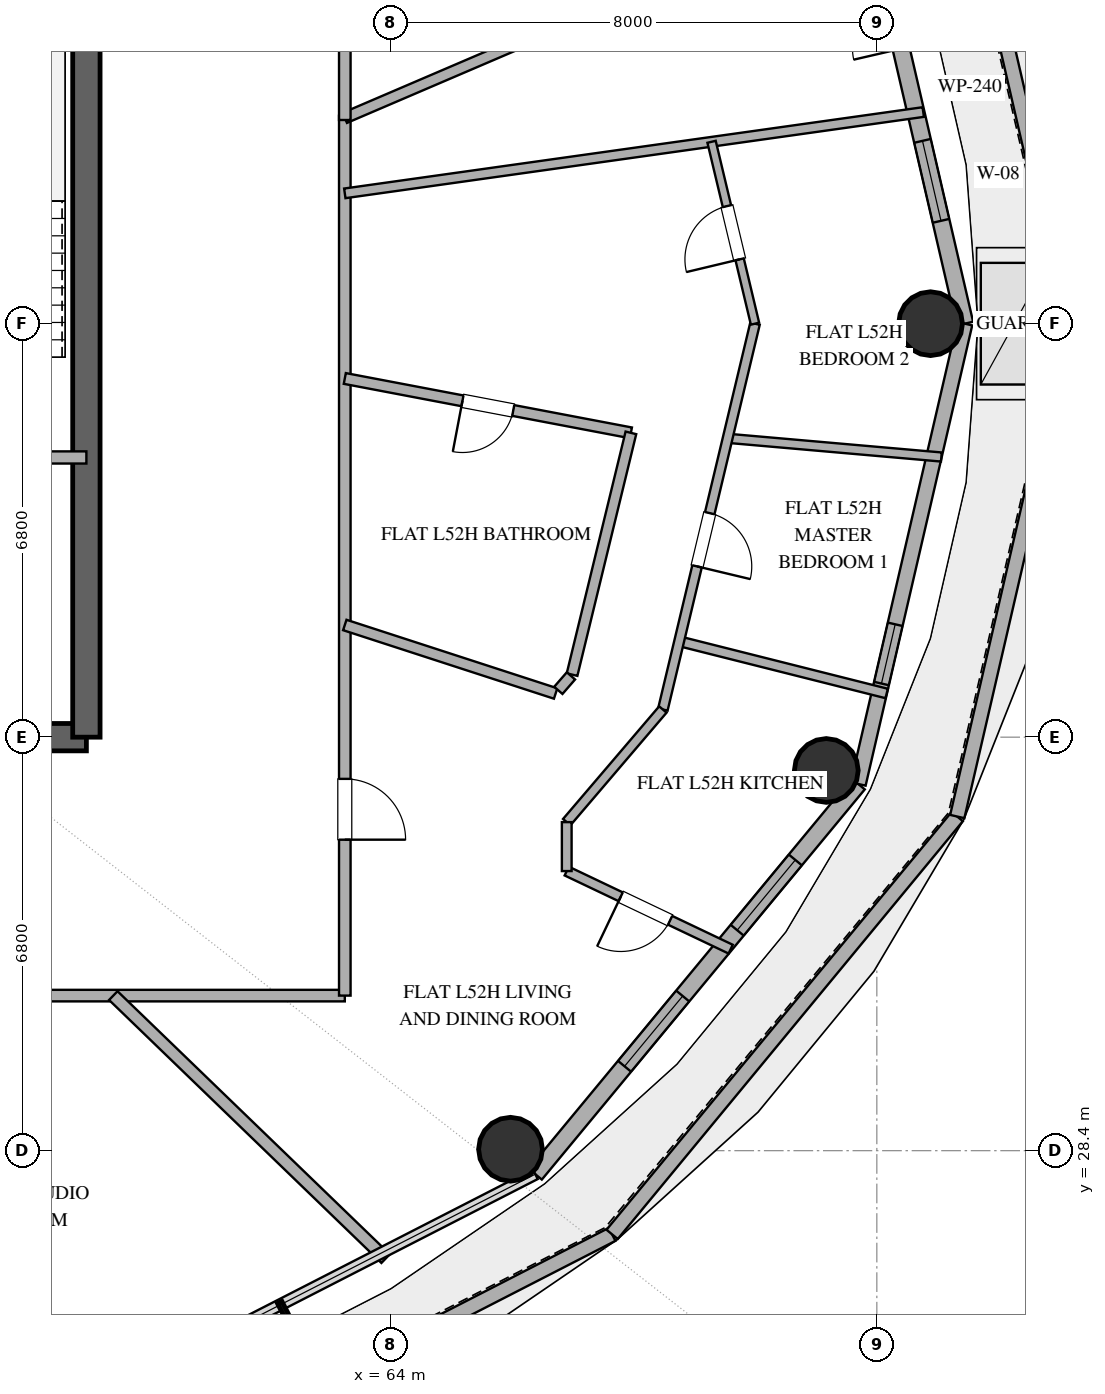
"""IFC4 building model, lengths in metres.
Left out: names, types, materials, properties, quantities, classifications, styles, units other than length and angle.
Written with IfcOpenShell. Run it as: python <this file> out.ifc"""

import sys

from ifc_helpers import new_model, si_unit, direction, frame, frame_2d, origin, origin_2d, place, context, subcontext, project, spatial, rectangle, hollow_circle, extrude, element, fill, save


model = new_model("IFC4")
c1 = context("Model", 3, precision=1e-05, world=origin(), true_north=direction((0.0, 1.0)))
c2 = subcontext(c1, "Body", "Model", "MODEL_VIEW")
j1 = project(units=[si_unit("LENGTHUNIT", "METRE"), si_unit("PLANEANGLEUNIT", "RADIAN")], contexts=[c1])
p1 = place(None, origin())
s1 = spatial("IfcSite", under=j1, at=p1, CompositionType="ELEMENT")
p2 = place(p1, origin())
s2 = spatial("IfcBuilding", under=s1, at=p2, CompositionType="ELEMENT")
p3 = place(p2, frame((0.0, 0.0, 206.4)))
s3 = spatial("IfcBuildingStorey", under=s2, at=p3, CompositionType="ELEMENT", Elevation=206.4)
p4 = place(p3, frame((55.0, 35.2, 0.0), z_axis=(0.0, 0.0, 1.0), x_axis=(1.0, 0.0, 0.0)))
e1 = element("IfcWall", 1, at=p4, inside=s3, PredefinedType="SHEAR", context=c2, shape_type="SweptSolid", body=[
    extrude(rectangle(XDim=4.0, YDim=0.45, at=frame_2d((2.0, 0.0))), origin(), (0.0, 0.0, 1.0), 3.36),
])
p5 = place(p4, frame((1.4, 0.0, 0.0)))
e2 = element("IfcOpeningElement", 2, at=p5, cuts=e1, PredefinedType="OPENING", context=c2, shape_type="SweptSolid", body=[
    extrude(rectangle(XDim=1.2, YDim=2.15, at=frame_2d((0.6, 1.075))), frame((0.0, 0.235, 0.0), z_axis=(0.0, -1.0, 0.0), x_axis=(1.0, 0.0, 0.0)), (0.0, 0.0, 1.0), 0.47),
])
p6 = place(p3, frame((59.0, 35.2, 0.0), z_axis=(0.0, 0.0, 1.0), x_axis=(0.0, 1.0, 0.0)))
e3 = element("IfcWall", 3, at=p6, inside=s3, PredefinedType="SHEAR", context=c2, shape_type="SweptSolid", body=[
    extrude(rectangle(XDim=13.6, YDim=0.45, at=frame_2d((6.8, 0.0))), origin(), (0.0, 0.0, 1.0), 3.36),
])
for number, where, z_axis, x_axis in (
    (4, (72.883, 42.0, 0.0), (0.0, 0.0, 1.0), (1.0, 0.0, 0.0)),
    (5, (65.975, 28.424, 0.0), (0.0, 0.0, 1.0), (1.0, 0.0, 0.0)),
    (6, (71.169, 34.653, 0.0), (0.0, 0.0, 1.0), (1.0, 0.0, 0.0)),
):
    element("IfcColumn", number, at=place(p3, frame(where, z_axis=z_axis, x_axis=x_axis)), inside=s3, PredefinedType="COLUMN", context=c2, shape_type="SweptSolid", body=[
        extrude(hollow_circle(Radius=0.525, WallThickness=0.028, at=origin_2d()), origin(), (0.0, 0.0, 1.0), 3.36),
    ])
p7 = place(p3, frame((75.197, 42.0, 0.0), z_axis=(0.0, 0.0, 1.0), x_axis=(-0.225241005172, 0.974303078918, 0.0)))
e7 = element("IfcWall", 7, at=p7, inside=s3, PredefinedType="PARAPET", context=c2, shape_type="SweptSolid", body=[
    extrude(rectangle(XDim=8.319, YDim=0.24, at=frame_2d((4.16, 0.0))), origin(), (0.0, 0.0, 1.0), 1.25),
])
p8 = place(p3, frame((58.701, 22.432, 0.0), z_axis=(0.0, 0.0, 1.0), x_axis=(0.889652072391, 0.456639015077, 0.0)))
e8 = element("IfcWall", 8, at=p8, inside=s3, PredefinedType="PARAPET", context=c2, shape_type="SweptSolid", body=[
    extrude(rectangle(XDim=10.055, YDim=0.24, at=frame_2d((5.027, 0.0))), origin(), (0.0, 0.0, 1.0), 1.25),
])
p9 = place(p3, frame((67.646, 27.023, 0.0), z_axis=(0.0, 0.0, 1.0), x_axis=(0.636894188862, 0.770951225561, 0.0)))
e9 = element("IfcWall", 9, at=p9, inside=s3, PredefinedType="PARAPET", context=c2, shape_type="SweptSolid", body=[
    extrude(rectangle(XDim=8.913, YDim=0.24, at=frame_2d((4.457, 0.0))), origin(), (0.0, 0.0, 1.0), 1.25),
])
p10 = place(p3, frame((73.323, 33.895, 0.0), z_axis=(0.0, 0.0, 1.0), x_axis=(0.225241005172, 0.974303078918, 0.0)))
e10 = element("IfcWall", 10, at=p10, inside=s3, PredefinedType="PARAPET", context=c2, shape_type="SweptSolid", body=[
    extrude(rectangle(XDim=8.319, YDim=0.24, at=frame_2d((4.16, 0.0))), origin(), (0.0, 0.0, 1.0), 1.25),
])
p11 = place(p3, frame((73.447, 42.0, 0.0), z_axis=(0.0, 0.0, 1.0), x_axis=(-0.225635078214, 0.974211892495, 0.0)))
e11 = element("IfcWall", 11, at=p11, inside=s3, PredefinedType="SOLIDWALL", context=c2, shape_type="SweptSolid", body=[
    extrude(rectangle(XDim=7.77, YDim=0.28, at=frame_2d((3.885, 0.0))), origin(), (0.0, 0.0, 1.0), 3.36),
])
p12 = place(p11, frame((1.736, 0.0, 0.85)))
e12 = element("IfcOpeningElement", 12, at=p12, cuts=e11, PredefinedType="OPENING", context=c2, shape_type="SweptSolid", body=[
    extrude(rectangle(XDim=1.35, YDim=1.8, at=frame_2d((0.675, 0.9))), frame((0.0, 0.15, 0.0), z_axis=(0.0, -1.0, 0.0), x_axis=(1.0, 0.0, 0.0)), (0.0, 0.0, 1.0), 0.3),
])
p13 = place(p11, frame((4.642, 0.0, 0.0)))
e13 = element("IfcOpeningElement", 13, at=p13, cuts=e11, PredefinedType="OPENING", context=c2, shape_type="SweptSolid", body=[
    extrude(rectangle(XDim=1.6, YDim=2.25, at=frame_2d((0.8, 1.125))), frame((0.0, 0.15, 0.0), z_axis=(0.0, -1.0, 0.0), x_axis=(1.0, 0.0, 0.0)), (0.0, 0.0, 1.0), 0.3),
])
p14 = place(p3, frame((66.383, 28.013, 0.0), z_axis=(0.0, 0.0, 1.0), x_axis=(0.63761509934, 0.770355103243, 0.0)))
e14 = element("IfcWall", 14, at=p14, inside=s3, PredefinedType="SOLIDWALL", context=c2, shape_type="SweptSolid", body=[
    extrude(rectangle(XDim=8.33, YDim=0.28, at=frame_2d((4.165, 0.0))), origin(), (0.0, 0.0, 1.0), 3.36),
])
p15 = place(p14, frame((2.303, 0.0, 0.85)))
e15 = element("IfcOpeningElement", 15, at=p15, cuts=e14, PredefinedType="OPENING", context=c2, shape_type="SweptSolid", body=[
    extrude(rectangle(XDim=1.5, YDim=2.0, at=frame_2d((0.75, 1.0))), frame((0.0, 0.15, 0.0), z_axis=(0.0, -1.0, 0.0), x_axis=(1.0, 0.0, 0.0)), (0.0, 0.0, 1.0), 0.3),
])
p16 = place(p14, frame((5.208, 0.0, 0.85)))
e16 = element("IfcOpeningElement", 16, at=p16, cuts=e14, PredefinedType="OPENING", context=c2, shape_type="SweptSolid", body=[
    extrude(rectangle(XDim=1.5, YDim=1.8, at=frame_2d((0.75, 0.9))), frame((0.0, 0.15, 0.0), z_axis=(0.0, -1.0, 0.0), x_axis=(1.0, 0.0, 0.0)), (0.0, 0.0, 1.0), 0.3),
])
p17 = place(p3, frame((71.694, 34.43, 0.0), z_axis=(0.0, 0.0, 1.0), x_axis=(0.225635078214, 0.974211892495, 0.0)))
e17 = element("IfcWall", 17, at=p17, inside=s3, PredefinedType="SOLIDWALL", context=c2, shape_type="SweptSolid", body=[
    extrude(rectangle(XDim=7.77, YDim=0.25, at=frame_2d((3.885, 0.0))), origin(), (0.0, 0.0, 1.0), 3.36),
])
p18 = place(p17, frame((1.695, 0.0, 1.42)))
e18 = element("IfcOpeningElement", 18, at=p18, cuts=e17, PredefinedType="OPENING", context=c2, shape_type="SweptSolid", body=[
    extrude(rectangle(XDim=1.0, YDim=1.05, at=frame_2d((0.5, 0.525))), frame((0.0, 0.135, 0.0), z_axis=(0.0, -1.0, 0.0), x_axis=(1.0, 0.0, 0.0)), (0.0, 0.0, 1.0), 0.27),
])
p19 = place(p3, frame((55.0, 39.8, 0.0), z_axis=(0.0, 0.0, 1.0), x_axis=(1.0, 0.0, 0.0)))
e19 = element("IfcWall", 19, at=p19, inside=s3, PredefinedType="SOLIDWALL", context=c2, shape_type="SweptSolid", body=[
    extrude(rectangle(XDim=4.0, YDim=0.2, at=frame_2d((2.0, 0.0))), origin(), (0.0, 0.0, 1.0), 2.72),
])
p20 = place(p19, frame((1.45, 0.0, 0.0)))
e20 = element("IfcOpeningElement", 20, at=p20, cuts=e19, PredefinedType="OPENING", context=c2, shape_type="SweptSolid", body=[
    extrude(rectangle(XDim=1.1, YDim=2.15, at=frame_2d((0.55, 1.075))), frame((0.0, 0.11, 0.0), z_axis=(0.0, -1.0, 0.0), x_axis=(1.0, 0.0, 0.0)), (0.0, 0.0, 1.0), 0.22),
])
p21 = place(p3, frame((50.961, 30.95, 0.0), z_axis=(0.0, 0.0, 1.0), x_axis=(1.0, 0.0, 0.0)))
e21 = element("IfcWall", 21, at=p21, inside=s3, PredefinedType="PARTITIONING", context=c2, shape_type="SweptSolid", body=[
    extrude(rectangle(XDim=12.289, YDim=0.19, at=frame_2d((6.145, 0.0))), origin(), (0.0, 0.0, 1.0), 2.72),
])
p22 = place(p21, frame((3.741, 0.0, 0.0)))
e22 = element("IfcOpeningElement", 22, at=p22, cuts=e21, PredefinedType="OPENING", context=c2, shape_type="SweptSolid", body=[
    extrude(rectangle(XDim=1.0, YDim=2.2, at=frame_2d((0.5, 1.1))), frame((0.0, 0.105, 0.0), z_axis=(0.0, -1.0, 0.0), x_axis=(1.0, 0.0, 0.0)), (0.0, 0.0, 1.0), 0.21),
])
p23 = place(p3, frame((63.921, 26.625, 0.0), z_axis=(0.0, 0.0, 1.0), x_axis=(-0.719350784266, 0.69464699609, 0.0)))
e23 = element("IfcWall", 23, at=p23, inside=s3, PredefinedType="PARTITIONING", context=c2, shape_type="SweptSolid", body=[
    extrude(rectangle(XDim=6.226, YDim=0.2, at=frame_2d((3.113, 0.0))), origin(), (0.0, 0.0, 1.0), 2.72),
])
p24 = place(p3, frame((63.25, 45.419, 0.0), z_axis=(0.0, 0.0, 1.0), x_axis=(0.0, -1.0, 0.0)))
e24 = element("IfcWall", 24, at=p24, inside=s3, PredefinedType="PARTITIONING", context=c2, shape_type="SweptSolid", body=[
    extrude(rectangle(XDim=14.469, YDim=0.19, at=frame_2d((7.235, 0.0))), origin(), (0.0, 0.0, 1.0), 2.72),
])
p25 = place(p24, frame((10.905, 0.0, 0.0)))
e25 = element("IfcOpeningElement", 25, at=p25, cuts=e24, PredefinedType="OPENING", context=c2, shape_type="SweptSolid", body=[
    extrude(rectangle(XDim=1.0, YDim=2.2, at=frame_2d((0.5, 1.1))), frame((0.0, 0.105, 0.0), z_axis=(0.0, -1.0, 0.0), x_axis=(1.0, 0.0, 0.0)), (0.0, 0.0, 1.0), 0.21),
])
p26 = place(p3, frame((63.25, 44.143, 0.0), z_axis=(0.0, 0.0, 1.0), x_axis=(0.990269661234, 0.139161769316, 0.0)))
e26 = element("IfcWall", 26, at=p26, inside=s3, PredefinedType="PLUMBINGWALL", context=c2, shape_type="SweptSolid", body=[
    extrude(rectangle(XDim=9.607, YDim=0.16, at=frame_2d((4.803, 0.0))), origin(), (0.0, 0.0, 1.0), 2.72),
])
p27 = place(p3, frame((68.407, 47.595, 0.0), z_axis=(0.0, 0.0, 1.0), x_axis=(-0.919138278408, -0.393935051963, 0.0)))
e27 = element("IfcWall", 27, at=p27, inside=s3, PredefinedType="PLUMBINGWALL", context=c2, shape_type="SweptSolid", body=[
    extrude(rectangle(XDim=5.611, YDim=0.18, at=frame_2d((2.806, 0.0))), origin(), (0.0, 0.0, 1.0), 2.72),
])
p28 = place(p3, frame((67.955, 40.205, 0.0), z_axis=(0.0, 0.0, 1.0), x_axis=(-0.982404536053, 0.186765434551, 0.0)))
e28 = element("IfcWall", 28, at=p28, inside=s3, PredefinedType="PLUMBINGWALL", context=c2, shape_type="SweptSolid", body=[
    extrude(rectangle(XDim=4.79, YDim=0.18, at=frame_2d((2.395, 0.0))), origin(), (0.0, 0.0, 1.0), 2.72),
])
p29 = place(p28, frame((1.97, 0.0, 0.0)))
e29 = element("IfcOpeningElement", 29, at=p29, cuts=e28, PredefinedType="OPENING", context=c2, shape_type="SweptSolid", body=[
    extrude(rectangle(XDim=0.85, YDim=2.1, at=frame_2d((0.425, 1.05))), frame((0.0, 0.1, 0.0), z_axis=(0.0, -1.0, 0.0), x_axis=(1.0, 0.0, 0.0)), (0.0, 0.0, 1.0), 0.2),
])
p30 = place(p3, frame((63.25, 45.35, 0.0), z_axis=(0.0, 0.0, 1.0), x_axis=(0.0, 1.0, 0.0)))
e30 = element("IfcWall", 30, at=p30, inside=s3, PredefinedType="PARTITIONING", context=c2, shape_type="SweptSolid", body=[
    extrude(rectangle(XDim=7.7, YDim=0.19, at=frame_2d((3.85, 0.0))), origin(), (0.0, 0.0, 1.0), 2.72),
])
p31 = place(p3, frame((66.988, 36.229, 0.0), z_axis=(0.0, 0.0, 1.0), x_axis=(0.236522101202, 0.971626108975, 0.0)))
e31 = element("IfcWall", 31, at=p31, inside=s3, PredefinedType="PLUMBINGWALL", context=c2, shape_type="SweptSolid", body=[
    extrude(rectangle(XDim=4.092, YDim=0.18, at=frame_2d((2.046, 0.0))), origin(), (0.0, 0.0, 1.0), 2.72),
])
p32 = place(p3, frame((63.25, 37.045, 0.0), z_axis=(0.0, 0.0, 1.0), x_axis=(0.951066543841, -0.308986131058, 0.0)))
e32 = element("IfcWall", 32, at=p32, inside=s3, PredefinedType="PLUMBINGWALL", context=c2, shape_type="SweptSolid", body=[
    extrude(rectangle(XDim=3.646, YDim=0.18, at=frame_2d((1.823, 0.0))), origin(), (0.0, 0.0, 1.0), 2.72),
])
p33 = place(p3, frame((73.061, 39.807, 0.0), z_axis=(0.0, 0.0, 1.0), x_axis=(-0.996192140099, 0.087184975795, 0.0)))
e33 = element("IfcWall", 33, at=p33, inside=s3, PredefinedType="PARTITIONING", context=c2, shape_type="SweptSolid", body=[
    extrude(rectangle(XDim=3.528, YDim=0.15, at=frame_2d((1.764, 0.0))), origin(), (0.0, 0.0, 1.0), 2.72),
])
p34 = place(p3, frame((68.749, 36.778, 0.0), z_axis=(0.0, 0.0, 1.0), x_axis=(0.96975767026, -0.244069787092, 0.0)))
e34 = element("IfcWall", 34, at=p34, inside=s3, PredefinedType="PLUMBINGWALL", context=c2, shape_type="SweptSolid", body=[
    extrude(rectangle(XDim=3.519, YDim=0.16, at=frame_2d((1.76, 0.0))), origin(), (0.0, 0.0, 1.0), 2.72),
])
p35 = place(p3, frame((69.996, 42.0, 0.0), z_axis=(0.0, 0.0, 1.0), x_axis=(-0.232298462197, -0.972644551962, 0.0)))
e35 = element("IfcWall", 35, at=p35, inside=s3, PredefinedType="PLUMBINGWALL", context=c2, shape_type="SweptSolid", body=[
    extrude(rectangle(XDim=6.523, YDim=0.16, at=frame_2d((3.262, 0.0))), origin(), (0.0, 0.0, 1.0), 2.72),
])
p36 = place(p35, frame((3.204, 0.0, 0.0)))
e36 = element("IfcOpeningElement", 36, at=p36, cuts=e35, PredefinedType="OPENING", context=c2, shape_type="SweptSolid", body=[
    extrude(rectangle(XDim=0.9, YDim=2.1, at=frame_2d((0.45, 1.05))), frame((0.0, 0.09, 0.0), z_axis=(0.0, -1.0, 0.0), x_axis=(1.0, 0.0, 0.0)), (0.0, 0.0, 1.0), 0.18),
])
p37 = place(p3, frame((69.996, 42.0, 0.0), z_axis=(0.0, 0.0, 1.0), x_axis=(-0.23230382896, 0.972643270192, 0.0)))
e37 = element("IfcWall", 37, at=p37, inside=s3, PredefinedType="PARTITIONING", context=c2, shape_type="SweptSolid", body=[
    extrude(rectangle(XDim=3.075, YDim=0.14, at=frame_2d((1.538, 0.0))), origin(), (0.0, 0.0, 1.0), 2.72),
])
p38 = place(p37, frame((1.088, 0.0, 0.0)))
e38 = element("IfcOpeningElement", 38, at=p38, cuts=e37, PredefinedType="OPENING", context=c2, shape_type="SweptSolid", body=[
    extrude(rectangle(XDim=0.9, YDim=2.1, at=frame_2d((0.45, 1.05))), frame((0.0, 0.08, 0.0), z_axis=(0.0, -1.0, 0.0), x_axis=(1.0, 0.0, 0.0)), (0.0, 0.0, 1.0), 0.16),
])
p39 = place(p3, frame((69.596, 31.714, 0.0), z_axis=(0.0, 0.0, 1.0), x_axis=(-0.902830295341, 0.42999704396, 0.0)))
e39 = element("IfcWall", 39, at=p39, inside=s3, PredefinedType="PLUMBINGWALL", context=c2, shape_type="SweptSolid", body=[
    extrude(rectangle(XDim=2.987, YDim=0.16, at=frame_2d((1.493, 0.0))), origin(), (0.0, 0.0, 1.0), 2.72),
])
p40 = place(p39, frame((1.103, 0.0, 0.0)))
e40 = element("IfcOpeningElement", 40, at=p40, cuts=e39, PredefinedType="OPENING", context=c2, shape_type="SweptSolid", body=[
    extrude(rectangle(XDim=0.9, YDim=2.1, at=frame_2d((0.45, 1.05))), frame((0.0, 0.09, 0.0), z_axis=(0.0, -1.0, 0.0), x_axis=(1.0, 0.0, 0.0)), (0.0, 0.0, 1.0), 0.18),
])
p41 = place(p3, frame((66.9, 33.803, 0.0), z_axis=(0.0, 0.0, 1.0), x_axis=(0.649270866973, 0.760557257082, 0.0)))
e41 = element("IfcWall", 41, at=p41, inside=s3, PredefinedType="PLUMBINGWALL", context=c2, shape_type="SweptSolid", body=[
    extrude(rectangle(XDim=2.435, YDim=0.16, at=frame_2d((1.218, 0.0))), origin(), (0.0, 0.0, 1.0), 2.72),
])
p42 = place(p3, frame((66.9, 32.998, 0.0), z_axis=(0.0, 0.0, 1.0), x_axis=(0.0, 1.0, 0.0)))
e42 = element("IfcWall", 42, at=p42, inside=s3, PredefinedType="PLUMBINGWALL", context=c2, shape_type="SweptSolid", body=[
    extrude(rectangle(XDim=0.805, YDim=0.16, at=frame_2d((0.402, 0.0))), origin(), (0.0, 0.0, 1.0), 2.72),
])
p43 = place(p3, frame((66.762, 35.97, 0.0), z_axis=(0.0, 0.0, 1.0), x_axis=(0.656312676344, 0.754489013088, 0.0)))
e43 = element("IfcWall", 43, at=p43, inside=s3, PredefinedType="PLUMBINGWALL", context=c2, shape_type="SweptSolid", body=[
    extrude(rectangle(XDim=0.316, YDim=0.18, at=frame_2d((0.158, 0.0))), origin(), (0.0, 0.0, 1.0), 2.72),
])
p44 = place(p3, origin())
p45 = place(p44, frame((74.26, 42.0, 0.0)))
p46 = place(p45, frame((0.0, 0.0, 0.11)))
e44 = element("IfcDoor", 44, at=p46, inside=s3, OperationType="SINGLE_SWING_LEFT", PredefinedType="TRAPDOOR", context=c2, shape_type="SweptSolid", body=[
    extrude(rectangle(XDim=1.1, YDim=2.0, at=origin_2d()), origin(), (0.0, 0.0, 1.0), 0.05),
])
p47 = place(p12, origin())
e45 = element("IfcWindow", 45, at=p47, inside=s3, PartitioningType="SINGLE_PANEL", PredefinedType="WINDOW", context=c2, shape_type="SweptSolid", body=[
    extrude(rectangle(XDim=1.35, YDim=1.8, at=frame_2d((0.675, 0.9))), frame((0.0, 0.03, 0.0), z_axis=(0.0, -1.0, 0.0), x_axis=(1.0, 0.0, 0.0)), (0.0, 0.0, 1.0), 0.06),
])
fill(e12, e45)
p48 = place(p15, origin())
e46 = element("IfcWindow", 46, at=p48, inside=s3, PartitioningType="SINGLE_PANEL", PredefinedType="WINDOW", context=c2, shape_type="SweptSolid", body=[
    extrude(rectangle(XDim=1.5, YDim=2.0, at=frame_2d((0.75, 1.0))), frame((0.0, 0.03, 0.0), z_axis=(0.0, -1.0, 0.0), x_axis=(1.0, 0.0, 0.0)), (0.0, 0.0, 1.0), 0.06),
])
fill(e15, e46)
p49 = place(p16, origin())
e47 = element("IfcWindow", 47, at=p49, inside=s3, PartitioningType="SINGLE_PANEL", PredefinedType="WINDOW", context=c2, shape_type="SweptSolid", body=[
    extrude(rectangle(XDim=1.5, YDim=1.8, at=frame_2d((0.75, 0.9))), frame((0.0, 0.03, 0.0), z_axis=(0.0, -1.0, 0.0), x_axis=(1.0, 0.0, 0.0)), (0.0, 0.0, 1.0), 0.06),
])
fill(e16, e47)
p50 = place(p18, origin())
e48 = element("IfcWindow", 48, at=p50, inside=s3, PartitioningType="SINGLE_PANEL", PredefinedType="WINDOW", context=c2, shape_type="SweptSolid", body=[
    extrude(rectangle(XDim=1.0, YDim=1.05, at=frame_2d((0.5, 0.525))), frame((0.0, 0.03, 0.0), z_axis=(0.0, -1.0, 0.0), x_axis=(1.0, 0.0, 0.0)), (0.0, 0.0, 1.0), 0.06),
])
fill(e18, e48)
p51 = place(p25, origin())
e49 = element("IfcDoor", 49, at=p51, inside=s3, OperationType="SINGLE_SWING_RIGHT", PredefinedType="DOOR", context=c2, shape_type="SweptSolid", body=[
    extrude(rectangle(XDim=1.0, YDim=2.2, at=frame_2d((0.5, 1.1))), frame((0.0, 0.025, 0.0), z_axis=(0.0, -1.0, 0.0), x_axis=(1.0, 0.0, 0.0)), (0.0, 0.0, 1.0), 0.05),
])
fill(e25, e49)
p52 = place(p29, origin())
e50 = element("IfcDoor", 50, at=p52, inside=s3, OperationType="SINGLE_SWING_RIGHT", PredefinedType="DOOR", context=c2, shape_type="SweptSolid", body=[
    extrude(rectangle(XDim=0.85, YDim=2.1, at=frame_2d((0.425, 1.05))), frame((0.0, 0.025, 0.0), z_axis=(0.0, -1.0, 0.0), x_axis=(1.0, 0.0, 0.0)), (0.0, 0.0, 1.0), 0.05),
])
fill(e29, e50)
p53 = place(p36, origin())
e51 = element("IfcDoor", 51, at=p53, inside=s3, OperationType="SINGLE_SWING_RIGHT", PredefinedType="DOOR", context=c2, shape_type="SweptSolid", body=[
    extrude(rectangle(XDim=0.9, YDim=2.1, at=frame_2d((0.45, 1.05))), frame((0.0, 0.025, 0.0), z_axis=(0.0, -1.0, 0.0), x_axis=(1.0, 0.0, 0.0)), (0.0, 0.0, 1.0), 0.05),
])
fill(e36, e51)
p54 = place(p38, origin())
e52 = element("IfcDoor", 52, at=p54, inside=s3, OperationType="SINGLE_SWING_LEFT", PredefinedType="DOOR", context=c2, shape_type="SweptSolid", body=[
    extrude(rectangle(XDim=0.9, YDim=2.1, at=frame_2d((0.45, 1.05))), frame((0.0, 0.025, 0.0), z_axis=(0.0, -1.0, 0.0), x_axis=(1.0, 0.0, 0.0)), (0.0, 0.0, 1.0), 0.05),
])
fill(e38, e52)
p55 = place(p40, origin())
e53 = element("IfcDoor", 53, at=p55, inside=s3, OperationType="SINGLE_SWING_RIGHT", PredefinedType="DOOR", context=c2, shape_type="SweptSolid", body=[
    extrude(rectangle(XDim=0.9, YDim=2.1, at=frame_2d((0.45, 1.05))), frame((0.0, 0.025, 0.0), z_axis=(0.0, -1.0, 0.0), x_axis=(1.0, 0.0, 0.0)), (0.0, 0.0, 1.0), 0.05),
])
fill(e40, e53)
save(model, sys.argv[1])
